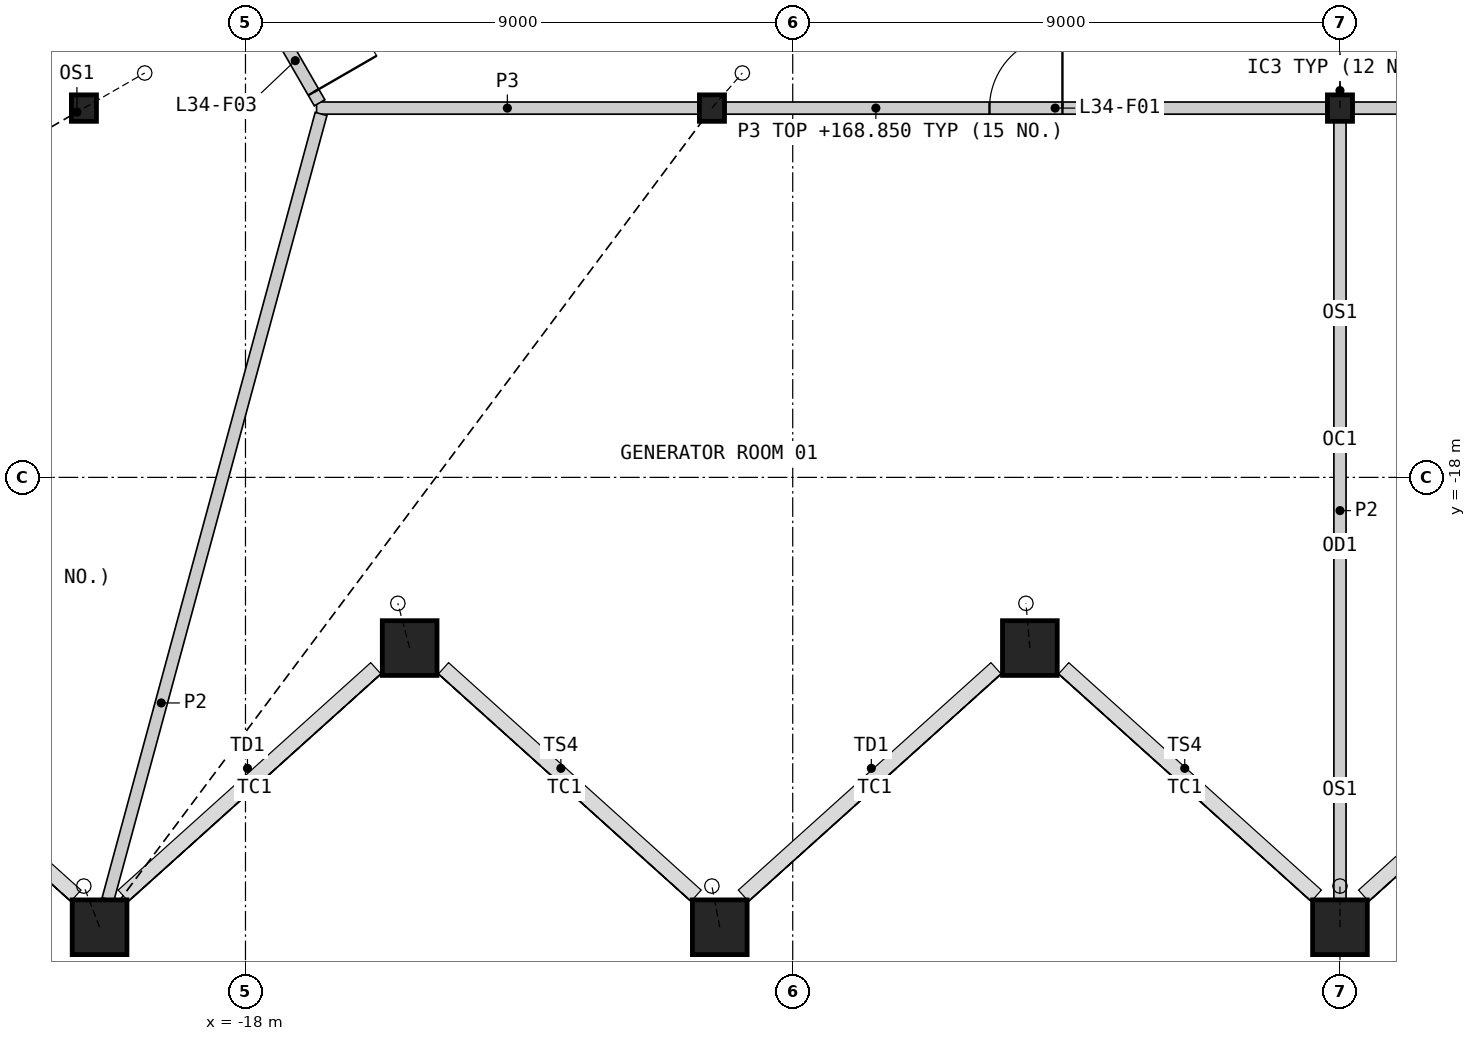
"""IFC4 building model, lengths in metres.
Left out: names, types, materials, properties, quantities, classifications, styles, units other than length and angle.
Written with IfcOpenShell. Run it as: python <this file> out.ifc"""

import sys

from ifc_helpers import new_model, si_unit, direction, frame, frame_2d, origin, origin_2d, place, context, subcontext, project, spatial, rectangle, hollow_rectangle, i_section, extrude, element, fill, save


model = new_model("IFC4")
c1 = context("Model", 3, precision=1e-05, world=origin(), true_north=direction((0.0, 1.0)))
c2 = subcontext(c1, "Body", "Model", "MODEL_VIEW")
j1 = project(units=[si_unit("LENGTHUNIT", "METRE"), si_unit("PLANEANGLEUNIT", "RADIAN")], contexts=[c1])
p1 = place(None, origin())
s1 = spatial("IfcSite", under=j1, at=p1, CompositionType="ELEMENT")
p2 = place(p1, origin())
s2 = spatial("IfcBuilding", under=s1, at=p2, CompositionType="ELEMENT")
p3 = place(p2, frame((0.0, 0.0, 164.2)))
s3 = spatial("IfcBuildingStorey", under=s2, at=p3, CompositionType="ELEMENT", Elevation=164.2)
p4 = place(p3, frame((-20.4, -25.399, 0.0), z_axis=(-0.051318190418, 0.13409414163, 0.989638926333), x_axis=(-0.93394282344, -0.3574224427, 0.0)))
e1 = element("IfcColumn", 1, at=p4, inside=s3, PredefinedType="COLUMN", context=c2, shape_type="SweptSolid", body=[
    extrude(hollow_rectangle(XDim=0.9, YDim=0.9, WallThickness=0.06, at=origin_2d()), frame((0.0, 0.0, 0.065)), (0.0, 0.0, 1.0), 4.922),
])
p5 = place(p3, frame((-15.3, -20.807, 0.0), z_axis=(-0.038424605206, 0.145492160916, 0.988612958051), x_axis=(-0.966849777203, -0.255345860204, 0.0)))
e2 = element("IfcColumn", 2, at=p5, inside=s3, PredefinedType="COLUMN", context=c2, shape_type="SweptSolid", body=[
    extrude(hollow_rectangle(XDim=0.9, YDim=0.9, WallThickness=0.06, at=origin_2d()), frame((0.0, 0.0, 0.069)), (0.0, 0.0, 1.0), 4.921),
])
p6 = place(p3, frame((-10.2, -25.399, 0.0), z_axis=(-0.025636135128, 0.134226933927, 0.990618957412), x_axis=(-0.982245501071, -0.187600041646, 0.0)))
e3 = element("IfcColumn", 3, at=p6, inside=s3, PredefinedType="COLUMN", context=c2, shape_type="SweptSolid", body=[
    extrude(hollow_rectangle(XDim=0.9, YDim=0.9, WallThickness=0.06, at=origin_2d()), frame((0.0, 0.0, 0.062)), (0.0, 0.0, 1.0), 4.923),
])
p7 = place(p3, frame((-5.1, -20.807, 0.0), z_axis=(-0.012848812001, 0.145587666803, 0.989261916433), x_axis=(-0.996128147691, -0.087913101289, 0.0)))
e4 = element("IfcColumn", 4, at=p7, inside=s3, PredefinedType="COLUMN", context=c2, shape_type="SweptSolid", body=[
    extrude(hollow_rectangle(XDim=0.9, YDim=0.9, WallThickness=0.06, at=origin_2d()), frame((0.0, 0.0, 0.066)), (0.0, 0.0, 1.0), 4.921),
])
p8 = place(p3, frame((0.0, -25.399, 0.0), z_axis=(0.0, 0.134271063417, 0.990944641001), x_axis=(-1.0, 0.0, 0.0)))
e5 = element("IfcColumn", 5, at=p8, inside=s3, PredefinedType="COLUMN", context=c2, shape_type="SweptSolid", body=[
    extrude(hollow_rectangle(XDim=0.9, YDim=0.9, WallThickness=0.06, at=origin_2d()), frame((0.0, 0.0, 0.061)), (0.0, 0.0, 1.0), 4.924),
])
p9 = place(p3, frame((-20.657, -11.926, 0.0), z_axis=(0.194870759968, 0.112516930499, 0.974353799839), x_axis=(-0.500027479704, 0.866009537788, 0.0)))
e6 = element("IfcColumn", 6, at=p9, inside=s3, PredefinedType="COLUMN", context=c2, shape_type="SweptSolid", body=[
    extrude(i_section(OverallWidth=0.412, OverallDepth=0.435, WebThickness=0.036, FlangeThickness=0.057, at=origin_2d()), frame((0.0, 0.0, 0.05)), (0.0, 0.0, 1.0), 5.031),
])
p10 = place(p3, frame((-10.328, -11.926, 0.0), z_axis=(0.098853266559, 0.114154284869, 0.988532665589), x_axis=(-0.755952685413, 0.654626257812, 0.0)))
e7 = element("IfcColumn", 7, at=p10, inside=s3, PredefinedType="COLUMN", context=c2, shape_type="SweptSolid", body=[
    extrude(i_section(OverallWidth=0.412, OverallDepth=0.435, WebThickness=0.036, FlangeThickness=0.057, at=origin_2d()), frame((0.0, 0.0, 0.033)), (0.0, 0.0, 1.0), 4.992),
])
p11 = place(p3, frame((0.0, -11.926, 0.0), z_axis=(0.0, 0.114716162252, 0.993398309903), x_axis=(-1.0, 0.0, 0.0)))
e8 = element("IfcColumn", 8, at=p11, inside=s3, PredefinedType="COLUMN", context=c2, shape_type="SweptSolid", body=[
    extrude(i_section(OverallWidth=0.412, OverallDepth=0.435, WebThickness=0.036, FlangeThickness=0.057, at=origin_2d()), frame((0.0, 0.0, 0.025)), (0.0, 0.0, 1.0), 4.983),
])
p12 = place(p3, frame((-10.101, -11.926, 0.0), z_axis=(0.0, 0.0, 1.0), x_axis=(1.0, 0.0, 0.0)))
e9 = element("IfcWall", 9, at=p12, inside=s3, PredefinedType="PARTITIONING", context=c2, shape_type="SweptSolid", body=[
    extrude(rectangle(XDim=9.874, YDim=0.2, at=frame_2d((4.937, 0.0))), origin(), (0.0, 0.0, 1.0), 4.65),
])
p13 = place(p12, frame((4.337, 0.0, 0.0)))
e10 = element("IfcOpeningElement", 10, at=p13, cuts=e9, PredefinedType="OPENING", context=c2, shape_type="SweptSolid", body=[
    extrude(rectangle(XDim=1.2, YDim=2.1, at=frame_2d((0.6, 1.05))), frame((0.0, 0.11, 0.0), z_axis=(0.0, -1.0, 0.0), x_axis=(1.0, 0.0, 0.0)), (0.0, 0.0, 1.0), 0.22),
])
p14 = place(p3, frame((0.227, -11.926, 0.0), z_axis=(0.0, 0.0, 1.0), x_axis=(1.0, 0.0, 0.0)))
e11 = element("IfcWall", 11, at=p14, inside=s3, PredefinedType="PARTITIONING", context=c2, shape_type="SweptSolid", body=[
    extrude(rectangle(XDim=9.874, YDim=0.2, at=frame_2d((4.937, 0.0))), origin(), (0.0, 0.0, 1.0), 4.65),
])
p15 = place(p14, frame((4.337, 0.0, 0.0)))
e12 = element("IfcOpeningElement", 12, at=p15, cuts=e11, PredefinedType="OPENING", context=c2, shape_type="SweptSolid", body=[
    extrude(rectangle(XDim=1.2, YDim=2.1, at=frame_2d((0.6, 1.05))), frame((0.0, 0.11, 0.0), z_axis=(0.0, -1.0, 0.0), x_axis=(1.0, 0.0, 0.0)), (0.0, 0.0, 1.0), 0.22),
])
p16 = place(p3, frame((-16.831, -11.926, 0.0), z_axis=(0.0, 0.0, 1.0), x_axis=(1.0, 0.0, 0.0)))
e13 = element("IfcWall", 13, at=p16, inside=s3, PredefinedType="PARTITIONING", context=c2, shape_type="SweptSolid", body=[
    extrude(rectangle(XDim=6.275, YDim=0.2, at=frame_2d((3.137, 0.0))), origin(), (0.0, 0.0, 1.0), 4.65),
])
p17 = place(p3, frame((-18.644, -8.613, 0.0), z_axis=(0.0, 0.0, 1.0), x_axis=(0.499958791762, -0.866049194065, 0.0)))
e14 = element("IfcWall", 14, at=p17, inside=s3, PredefinedType="PARTITIONING", context=c2, shape_type="SweptSolid", body=[
    extrude(rectangle(XDim=3.726, YDim=0.2, at=frame_2d((1.863, 0.0))), origin(), (0.0, 0.0, 1.0), 4.65),
])
p18 = place(p17, frame((2.325, 0.0, 0.0)))
e15 = element("IfcOpeningElement", 15, at=p18, cuts=e14, PredefinedType="OPENING", context=c2, shape_type="SweptSolid", body=[
    extrude(rectangle(XDim=1.2, YDim=2.1, at=frame_2d((0.6, 1.05))), frame((0.0, 0.11, 0.0), z_axis=(0.0, -1.0, 0.0), x_axis=(1.0, 0.0, 0.0)), (0.0, 0.0, 1.0), 0.22),
])
p19 = place(p3, frame((-20.261, -24.939, 0.0), z_axis=(0.0, 0.0, 1.0), x_axis=(0.261845290604, 0.965109860994, 0.0)))
e16 = element("IfcWall", 16, at=p19, inside=s3, PredefinedType="PARTITIONING", context=c2, shape_type="SweptSolid", body=[
    extrude(rectangle(XDim=13.384, YDim=0.2, at=frame_2d((6.692, 0.0))), origin(), (0.0, 0.0, 1.0), 4.65),
])
p20 = place(p3, frame((0.0, -24.939, 0.0), z_axis=(0.0, 0.0, 1.0), x_axis=(0.0, 1.0, 0.0)))
e17 = element("IfcWall", 17, at=p20, inside=s3, PredefinedType="PARTITIONING", context=c2, shape_type="SweptSolid", body=[
    extrude(rectangle(XDim=12.785, YDim=0.2, at=frame_2d((6.393, 0.0))), origin(), (0.0, 0.0, 1.0), 4.65),
])
p21 = place(p13, origin())
e18 = element("IfcDoor", 18, at=p21, inside=s3, OperationType="SINGLE_SWING_RIGHT", PredefinedType="DOOR", context=c2, shape_type="SweptSolid", body=[
    extrude(rectangle(XDim=1.2, YDim=2.1, at=frame_2d((0.6, 1.05))), frame((0.0, 0.025, 0.0), z_axis=(0.0, -1.0, 0.0), x_axis=(1.0, 0.0, 0.0)), (0.0, 0.0, 1.0), 0.05),
])
fill(e10, e18)
p22 = place(p18, origin())
e19 = element("IfcDoor", 19, at=p22, inside=s3, OperationType="SINGLE_SWING_RIGHT", PredefinedType="DOOR", context=c2, shape_type="SweptSolid", body=[
    extrude(rectangle(XDim=1.2, YDim=2.1, at=frame_2d((0.6, 1.05))), frame((0.0, 0.025, 0.0), z_axis=(0.0, -1.0, 0.0), x_axis=(1.0, 0.0, 0.0)), (0.0, 0.0, 1.0), 0.05),
])
fill(e15, e19)
save(model, sys.argv[1])
